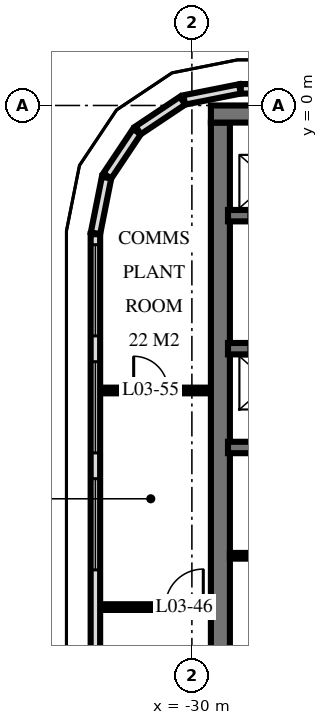
"""IFC4 building model, lengths in metres.
Left out: names, types, materials, properties, quantities, classifications, styles, units other than length and angle.
Written with IfcOpenShell. Run it as: python <this file> out.ifc"""

import sys

from ifc_helpers import new_model, si_unit, direction, frame, frame_2d, origin, place, context, subcontext, project, spatial, rectangle, extrude, element, fill, save


model = new_model("IFC4")
c1 = context("Model", 3, precision=1e-05, world=origin(), true_north=direction((0.0, 1.0)))
c2 = subcontext(c1, "Body", "Model", "MODEL_VIEW")
j1 = project(units=[si_unit("LENGTHUNIT", "METRE"), si_unit("PLANEANGLEUNIT", "RADIAN")], contexts=[c1])
p1 = place(None, origin())
s1 = spatial("IfcSite", under=j1, at=p1, CompositionType="ELEMENT")
p2 = place(p1, origin())
s2 = spatial("IfcBuilding", under=s1, at=p2, CompositionType="ELEMENT")
p3 = place(p2, frame((0.0, 0.0, 18.0)))
s3 = spatial("IfcBuildingStorey", under=s2, at=p3, CompositionType="ELEMENT", Elevation=18.0)
p4 = place(p3, frame((-29.5, -0.225, 0.0), z_axis=(0.0, 0.0, 1.0), x_axis=(1.0, 0.0, 0.0)))
e1 = element("IfcWall", 1, at=p4, inside=s3, PredefinedType="SHEAR", context=c2, shape_type="SweptSolid", body=[
    extrude(rectangle(XDim=19.5, YDim=0.45, at=frame_2d((9.75, 0.0))), origin(), (0.0, 0.0, 1.0), 6.0),
])
p5 = place(p3, frame((-29.25, -14.55, 0.0), z_axis=(0.0, 0.0, 1.0), x_axis=(0.0, 1.0, 0.0)))
e2 = element("IfcWall", 2, at=p5, inside=s3, PredefinedType="SHEAR", context=c2, shape_type="SweptSolid", body=[
    extrude(rectangle(XDim=14.1, YDim=0.5, at=frame_2d((7.05, 0.0))), origin(), (0.0, 0.0, 1.0), 6.0),
])
p6 = place(p3, frame((-29.05, -2.9, 0.0), z_axis=(0.0, 0.0, 1.0), x_axis=(1.0, 0.0, 0.0)))
e3 = element("IfcWall", 3, at=p6, inside=s3, PredefinedType="SHEAR", context=c2, shape_type="SweptSolid", body=[
    extrude(rectangle(XDim=18.7, YDim=0.3, at=frame_2d((9.35, 0.0))), origin(), (0.0, 0.0, 1.0), 6.0),
])
p7 = place(p6, frame((2.95, 0.0, 0.0)))
e4 = element("IfcOpeningElement", 4, at=p7, cuts=e3, PredefinedType="OPENING", context=c2, shape_type="SweptSolid", body=[
    extrude(rectangle(XDim=1.1, YDim=2.1, at=frame_2d((0.55, 1.05))), frame((0.0, 0.16, 0.0), z_axis=(0.0, -1.0, 0.0), x_axis=(1.0, 0.0, 0.0)), (0.0, 0.0, 1.0), 0.32),
])
p8 = place(p6, frame((0.55, 0.0, 0.0)))
e5 = element("IfcOpeningElement", 5, at=p8, cuts=e3, PredefinedType="OPENING", context=c2, shape_type="SweptSolid", body=[
    extrude(rectangle(XDim=1.1, YDim=2.1, at=frame_2d((0.55, 1.05))), frame((0.0, 0.16, 0.0), z_axis=(0.0, -1.0, 0.0), x_axis=(1.0, 0.0, 0.0)), (0.0, 0.0, 1.0), 0.32),
])
p9 = place(p6, frame((11.613, 0.0, 0.0)))
e6 = element("IfcOpeningElement", 6, at=p9, cuts=e3, PredefinedType="OPENING", context=c2, shape_type="SweptSolid", body=[
    extrude(rectangle(XDim=0.9, YDim=2.1, at=frame_2d((0.45, 1.05))), frame((0.0, 0.16, 0.0), z_axis=(0.0, -1.0, 0.0), x_axis=(1.0, 0.0, 0.0)), (0.0, 0.0, 1.0), 0.32),
])
p10 = place(p6, frame((10.188, 0.0, 0.0)))
e7 = element("IfcOpeningElement", 7, at=p10, cuts=e3, PredefinedType="OPENING", context=c2, shape_type="SweptSolid", body=[
    extrude(rectangle(XDim=0.9, YDim=2.1, at=frame_2d((0.45, 1.05))), frame((0.0, 0.16, 0.0), z_axis=(0.0, -1.0, 0.0), x_axis=(1.0, 0.0, 0.0)), (0.0, 0.0, 1.0), 0.32),
])
p11 = place(p6, frame((17.562, 0.0, 0.0)))
e8 = element("IfcOpeningElement", 8, at=p11, cuts=e3, PredefinedType="OPENING", context=c2, shape_type="SweptSolid", body=[
    extrude(rectangle(XDim=1.0, YDim=2.1, at=frame_2d((0.5, 1.05))), frame((0.0, 0.16, 0.0), z_axis=(0.0, -1.0, 0.0), x_axis=(1.0, 0.0, 0.0)), (0.0, 0.0, 1.0), 0.32),
])
p12 = place(p6, frame((16.137, 0.0, 0.0)))
e9 = element("IfcOpeningElement", 9, at=p12, cuts=e3, PredefinedType="OPENING", context=c2, shape_type="SweptSolid", body=[
    extrude(rectangle(XDim=1.0, YDim=2.1, at=frame_2d((0.5, 1.05))), frame((0.0, 0.16, 0.0), z_axis=(0.0, -1.0, 0.0), x_axis=(1.0, 0.0, 0.0)), (0.0, 0.0, 1.0), 0.32),
])
p13 = place(p6, frame((13.85, 0.0, 0.0)))
e10 = element("IfcOpeningElement", 10, at=p13, cuts=e3, PredefinedType="OPENING", context=c2, shape_type="SweptSolid", body=[
    extrude(rectangle(XDim=1.0, YDim=2.1, at=frame_2d((0.5, 1.05))), frame((0.0, 0.16, 0.0), z_axis=(0.0, -1.0, 0.0), x_axis=(1.0, 0.0, 0.0)), (0.0, 0.0, 1.0), 0.32),
])
p14 = place(p6, frame((5.6, 0.0, 0.0)))
e11 = element("IfcOpeningElement", 11, at=p14, cuts=e3, PredefinedType="OPENING", context=c2, shape_type="SweptSolid", body=[
    extrude(rectangle(XDim=1.0, YDim=2.1, at=frame_2d((0.5, 1.05))), frame((0.0, 0.16, 0.0), z_axis=(0.0, -1.0, 0.0), x_axis=(1.0, 0.0, 0.0)), (0.0, 0.0, 1.0), 0.32),
])
p15 = place(p3, frame((-29.05, -6.4, 0.0), z_axis=(0.0, 0.0, 1.0), x_axis=(1.0, 0.0, 0.0)))
e12 = element("IfcWall", 12, at=p15, inside=s3, PredefinedType="SHEAR", context=c2, shape_type="SweptSolid", body=[
    extrude(rectangle(XDim=18.7, YDim=0.3, at=frame_2d((9.35, 0.0))), origin(), (0.0, 0.0, 1.0), 6.0),
])
p16 = place(p15, frame((2.95, 0.0, 0.0)))
e13 = element("IfcOpeningElement", 13, at=p16, cuts=e12, PredefinedType="OPENING", context=c2, shape_type="SweptSolid", body=[
    extrude(rectangle(XDim=1.1, YDim=2.1, at=frame_2d((0.55, 1.05))), frame((0.0, 0.16, 0.0), z_axis=(0.0, -1.0, 0.0), x_axis=(1.0, 0.0, 0.0)), (0.0, 0.0, 1.0), 0.32),
])
p17 = place(p15, frame((0.55, 0.0, 0.0)))
e14 = element("IfcOpeningElement", 14, at=p17, cuts=e12, PredefinedType="OPENING", context=c2, shape_type="SweptSolid", body=[
    extrude(rectangle(XDim=1.1, YDim=2.1, at=frame_2d((0.55, 1.05))), frame((0.0, 0.16, 0.0), z_axis=(0.0, -1.0, 0.0), x_axis=(1.0, 0.0, 0.0)), (0.0, 0.0, 1.0), 0.32),
])
p18 = place(p15, frame((10.8, 0.0, 0.0)))
e15 = element("IfcOpeningElement", 15, at=p18, cuts=e12, PredefinedType="OPENING", context=c2, shape_type="SweptSolid", body=[
    extrude(rectangle(XDim=1.1, YDim=2.1, at=frame_2d((0.55, 1.05))), frame((0.0, 0.16, 0.0), z_axis=(0.0, -1.0, 0.0), x_axis=(1.0, 0.0, 0.0)), (0.0, 0.0, 1.0), 0.32),
])
p19 = place(p15, frame((5.6, 0.0, 0.0)))
e16 = element("IfcOpeningElement", 16, at=p19, cuts=e12, PredefinedType="OPENING", context=c2, shape_type="SweptSolid", body=[
    extrude(rectangle(XDim=1.0, YDim=2.1, at=frame_2d((0.5, 1.05))), frame((0.0, 0.16, 0.0), z_axis=(0.0, -1.0, 0.0), x_axis=(1.0, 0.0, 0.0)), (0.0, 0.0, 1.0), 0.32),
])
p20 = place(p3, frame((-29.05, -9.0, 0.0), z_axis=(0.0, 0.0, 1.0), x_axis=(1.0, 0.0, 0.0)))
e17 = element("IfcWall", 17, at=p20, inside=s3, PredefinedType="SHEAR", context=c2, shape_type="SweptSolid", body=[
    extrude(rectangle(XDim=18.7, YDim=0.3, at=frame_2d((9.35, 0.0))), origin(), (0.0, 0.0, 1.0), 6.0),
])
p21 = place(p20, frame((13.8, 0.0, 0.0)))
e18 = element("IfcOpeningElement", 18, at=p21, cuts=e17, PredefinedType="OPENING", context=c2, shape_type="SweptSolid", body=[
    extrude(rectangle(XDim=1.1, YDim=2.1, at=frame_2d((0.55, 1.05))), frame((0.0, 0.16, 0.0), z_axis=(0.0, -1.0, 0.0), x_axis=(1.0, 0.0, 0.0)), (0.0, 0.0, 1.0), 0.32),
])
p22 = place(p3, frame((28.713, 0.439, 0.0), z_axis=(0.0, 0.0, 1.0), x_axis=(-1.0, 0.0, 0.0)))
e19 = element("IfcWall", 19, at=p22, inside=s3, PredefinedType="SOLIDWALL", context=c2, shape_type="SweptSolid", body=[
    extrude(rectangle(XDim=57.426, YDim=0.25, at=frame_2d((28.713, 0.0))), origin(), (0.0, 0.0, 1.0), 5.72),
])
p23 = place(p22, frame((0.252, 0.0, 0.858)))
e20 = element("IfcOpeningElement", 20, at=p23, cuts=e19, PredefinedType="OPENING", context=c2, shape_type="SweptSolid", body=[
    extrude(rectangle(XDim=2.4, YDim=3.6, at=frame_2d((1.2, 1.8))), frame((0.0, 0.135, 0.0), z_axis=(0.0, -1.0, 0.0), x_axis=(1.0, 0.0, 0.0)), (0.0, 0.0, 1.0), 0.27),
])
p24 = place(p22, frame((3.281, 0.0, 0.858)))
e21 = element("IfcOpeningElement", 21, at=p24, cuts=e19, PredefinedType="OPENING", context=c2, shape_type="SweptSolid", body=[
    extrude(rectangle(XDim=2.4, YDim=3.6, at=frame_2d((1.2, 1.8))), frame((0.0, 0.135, 0.0), z_axis=(0.0, -1.0, 0.0), x_axis=(1.0, 0.0, 0.0)), (0.0, 0.0, 1.0), 0.27),
])
p25 = place(p22, frame((6.31, 0.0, 0.858)))
e22 = element("IfcOpeningElement", 22, at=p25, cuts=e19, PredefinedType="OPENING", context=c2, shape_type="SweptSolid", body=[
    extrude(rectangle(XDim=2.4, YDim=3.6, at=frame_2d((1.2, 1.8))), frame((0.0, 0.135, 0.0), z_axis=(0.0, -1.0, 0.0), x_axis=(1.0, 0.0, 0.0)), (0.0, 0.0, 1.0), 0.27),
])
p26 = place(p22, frame((9.339, 0.0, 0.858)))
e23 = element("IfcOpeningElement", 23, at=p26, cuts=e19, PredefinedType="OPENING", context=c2, shape_type="SweptSolid", body=[
    extrude(rectangle(XDim=2.4, YDim=3.6, at=frame_2d((1.2, 1.8))), frame((0.0, 0.135, 0.0), z_axis=(0.0, -1.0, 0.0), x_axis=(1.0, 0.0, 0.0)), (0.0, 0.0, 1.0), 0.27),
])
p27 = place(p22, frame((12.368, 0.0, 0.858)))
e24 = element("IfcOpeningElement", 24, at=p27, cuts=e19, PredefinedType="OPENING", context=c2, shape_type="SweptSolid", body=[
    extrude(rectangle(XDim=2.4, YDim=3.6, at=frame_2d((1.2, 1.8))), frame((0.0, 0.135, 0.0), z_axis=(0.0, -1.0, 0.0), x_axis=(1.0, 0.0, 0.0)), (0.0, 0.0, 1.0), 0.27),
])
p28 = place(p22, frame((15.397, 0.0, 0.858)))
e25 = element("IfcOpeningElement", 25, at=p28, cuts=e19, PredefinedType="OPENING", context=c2, shape_type="SweptSolid", body=[
    extrude(rectangle(XDim=2.4, YDim=3.6, at=frame_2d((1.2, 1.8))), frame((0.0, 0.135, 0.0), z_axis=(0.0, -1.0, 0.0), x_axis=(1.0, 0.0, 0.0)), (0.0, 0.0, 1.0), 0.27),
])
p29 = place(p22, frame((18.426, 0.0, 0.858)))
e26 = element("IfcOpeningElement", 26, at=p29, cuts=e19, PredefinedType="OPENING", context=c2, shape_type="SweptSolid", body=[
    extrude(rectangle(XDim=2.4, YDim=3.6, at=frame_2d((1.2, 1.8))), frame((0.0, 0.135, 0.0), z_axis=(0.0, -1.0, 0.0), x_axis=(1.0, 0.0, 0.0)), (0.0, 0.0, 1.0), 0.27),
])
p30 = place(p22, frame((21.455, 0.0, 0.858)))
e27 = element("IfcOpeningElement", 27, at=p30, cuts=e19, PredefinedType="OPENING", context=c2, shape_type="SweptSolid", body=[
    extrude(rectangle(XDim=2.4, YDim=3.6, at=frame_2d((1.2, 1.8))), frame((0.0, 0.135, 0.0), z_axis=(0.0, -1.0, 0.0), x_axis=(1.0, 0.0, 0.0)), (0.0, 0.0, 1.0), 0.27),
])
p31 = place(p22, frame((24.484, 0.0, 0.858)))
e28 = element("IfcOpeningElement", 28, at=p31, cuts=e19, PredefinedType="OPENING", context=c2, shape_type="SweptSolid", body=[
    extrude(rectangle(XDim=2.4, YDim=3.6, at=frame_2d((1.2, 1.8))), frame((0.0, 0.135, 0.0), z_axis=(0.0, -1.0, 0.0), x_axis=(1.0, 0.0, 0.0)), (0.0, 0.0, 1.0), 0.27),
])
p32 = place(p22, frame((27.513, 0.0, 0.858)))
e29 = element("IfcOpeningElement", 29, at=p32, cuts=e19, PredefinedType="OPENING", context=c2, shape_type="SweptSolid", body=[
    extrude(rectangle(XDim=2.4, YDim=3.6, at=frame_2d((1.2, 1.8))), frame((0.0, 0.135, 0.0), z_axis=(0.0, -1.0, 0.0), x_axis=(1.0, 0.0, 0.0)), (0.0, 0.0, 1.0), 0.27),
])
p33 = place(p22, frame((30.542, 0.0, 0.858)))
e30 = element("IfcOpeningElement", 30, at=p33, cuts=e19, PredefinedType="OPENING", context=c2, shape_type="SweptSolid", body=[
    extrude(rectangle(XDim=2.4, YDim=3.6, at=frame_2d((1.2, 1.8))), frame((0.0, 0.135, 0.0), z_axis=(0.0, -1.0, 0.0), x_axis=(1.0, 0.0, 0.0)), (0.0, 0.0, 1.0), 0.27),
])
p34 = place(p22, frame((33.571, 0.0, 0.858)))
e31 = element("IfcOpeningElement", 31, at=p34, cuts=e19, PredefinedType="OPENING", context=c2, shape_type="SweptSolid", body=[
    extrude(rectangle(XDim=2.4, YDim=3.6, at=frame_2d((1.2, 1.8))), frame((0.0, 0.135, 0.0), z_axis=(0.0, -1.0, 0.0), x_axis=(1.0, 0.0, 0.0)), (0.0, 0.0, 1.0), 0.27),
])
p35 = place(p22, frame((36.6, 0.0, 0.858)))
e32 = element("IfcOpeningElement", 32, at=p35, cuts=e19, PredefinedType="OPENING", context=c2, shape_type="SweptSolid", body=[
    extrude(rectangle(XDim=2.4, YDim=3.6, at=frame_2d((1.2, 1.8))), frame((0.0, 0.135, 0.0), z_axis=(0.0, -1.0, 0.0), x_axis=(1.0, 0.0, 0.0)), (0.0, 0.0, 1.0), 0.27),
])
p36 = place(p22, frame((39.629, 0.0, 0.858)))
e33 = element("IfcOpeningElement", 33, at=p36, cuts=e19, PredefinedType="OPENING", context=c2, shape_type="SweptSolid", body=[
    extrude(rectangle(XDim=2.4, YDim=3.6, at=frame_2d((1.2, 1.8))), frame((0.0, 0.135, 0.0), z_axis=(0.0, -1.0, 0.0), x_axis=(1.0, 0.0, 0.0)), (0.0, 0.0, 1.0), 0.27),
])
p37 = place(p22, frame((42.658, 0.0, 0.858)))
e34 = element("IfcOpeningElement", 34, at=p37, cuts=e19, PredefinedType="OPENING", context=c2, shape_type="SweptSolid", body=[
    extrude(rectangle(XDim=2.4, YDim=3.6, at=frame_2d((1.2, 1.8))), frame((0.0, 0.135, 0.0), z_axis=(0.0, -1.0, 0.0), x_axis=(1.0, 0.0, 0.0)), (0.0, 0.0, 1.0), 0.27),
])
p38 = place(p22, frame((45.687, 0.0, 0.858)))
e35 = element("IfcOpeningElement", 35, at=p38, cuts=e19, PredefinedType="OPENING", context=c2, shape_type="SweptSolid", body=[
    extrude(rectangle(XDim=2.4, YDim=3.6, at=frame_2d((1.2, 1.8))), frame((0.0, 0.135, 0.0), z_axis=(0.0, -1.0, 0.0), x_axis=(1.0, 0.0, 0.0)), (0.0, 0.0, 1.0), 0.27),
])
p39 = place(p22, frame((48.716, 0.0, 0.858)))
e36 = element("IfcOpeningElement", 36, at=p39, cuts=e19, PredefinedType="OPENING", context=c2, shape_type="SweptSolid", body=[
    extrude(rectangle(XDim=2.4, YDim=3.6, at=frame_2d((1.2, 1.8))), frame((0.0, 0.135, 0.0), z_axis=(0.0, -1.0, 0.0), x_axis=(1.0, 0.0, 0.0)), (0.0, 0.0, 1.0), 0.27),
])
p40 = place(p22, frame((51.745, 0.0, 0.858)))
e37 = element("IfcOpeningElement", 37, at=p40, cuts=e19, PredefinedType="OPENING", context=c2, shape_type="SweptSolid", body=[
    extrude(rectangle(XDim=2.4, YDim=3.6, at=frame_2d((1.2, 1.8))), frame((0.0, 0.135, 0.0), z_axis=(0.0, -1.0, 0.0), x_axis=(1.0, 0.0, 0.0)), (0.0, 0.0, 1.0), 0.27),
])
p41 = place(p22, frame((54.774, 0.0, 0.858)))
e38 = element("IfcOpeningElement", 38, at=p41, cuts=e19, PredefinedType="OPENING", context=c2, shape_type="SweptSolid", body=[
    extrude(rectangle(XDim=2.4, YDim=3.6, at=frame_2d((1.2, 1.8))), frame((0.0, 0.135, 0.0), z_axis=(0.0, -1.0, 0.0), x_axis=(1.0, 0.0, 0.0)), (0.0, 0.0, 1.0), 0.27),
])
p42 = place(p3, frame((-28.737, 0.437, 0.0), z_axis=(0.0, 0.0, 1.0), x_axis=(-0.980800292268, -0.195014837095, 0.0)))
e39 = element("IfcWall", 39, at=p42, inside=s3, PredefinedType="SOLIDWALL", context=c2, shape_type="SweptSolid", body=[
    extrude(rectangle(XDim=1.492, YDim=0.25, at=frame_2d((0.746, 0.0))), origin(), (0.0, 0.0, 1.0), 5.72),
])
for number, where, z_axis, x_axis in (
    (40, (-30.246, 0.127, 0.0), (0.0, 0.0, 1.0), (-0.831, -0.556, 0.0)),
    (41, (-31.447, -0.687, 0.0), (0.0, 0.0, 1.0), (-0.556, -0.831, 0.0)),
):
    element("IfcWall", number, at=place(p3, frame(where, z_axis=z_axis, x_axis=x_axis)), inside=s3, PredefinedType="SOLIDWALL", context=c2, shape_type="SweptSolid", body=[
        extrude(rectangle(XDim=1.403, YDim=0.25, at=frame_2d((0.702, 0.0))), origin(), (0.0, 0.0, 1.0), 5.72),
    ])
p43 = place(p3, frame((-32.246, -1.899, 0.0), z_axis=(0.0, 0.0, 1.0), x_axis=(-0.195014837095, -0.980800292268, 0.0)))
e42 = element("IfcWall", 42, at=p43, inside=s3, PredefinedType="SOLIDWALL", context=c2, shape_type="SweptSolid", body=[
    extrude(rectangle(XDim=1.492, YDim=0.25, at=frame_2d((0.746, 0.0))), origin(), (0.0, 0.0, 1.0), 5.72),
])
p44 = place(p3, frame((-32.539, -3.387, 0.0), z_axis=(0.0, 0.0, 1.0), x_axis=(0.0, -1.0, 0.0)))
e43 = element("IfcWall", 43, at=p44, inside=s3, PredefinedType="SOLIDWALL", context=c2, shape_type="SweptSolid", body=[
    extrude(rectangle(XDim=12.502, YDim=0.25, at=frame_2d((6.251, 0.0))), origin(), (0.0, 0.0, 1.0), 5.72),
])
p45 = place(p44, frame((0.277, 0.0, 1.005)))
e44 = element("IfcOpeningElement", 44, at=p45, cuts=e43, PredefinedType="OPENING", context=c2, shape_type="SweptSolid", body=[
    extrude(rectangle(XDim=2.4, YDim=3.6, at=frame_2d((1.2, 1.8))), frame((0.0, 0.135, 0.0), z_axis=(0.0, -1.0, 0.0), x_axis=(1.0, 0.0, 0.0)), (0.0, 0.0, 1.0), 0.27),
])
p46 = place(p44, frame((3.355, 0.0, 1.005)))
e45 = element("IfcOpeningElement", 45, at=p46, cuts=e43, PredefinedType="OPENING", context=c2, shape_type="SweptSolid", body=[
    extrude(rectangle(XDim=2.4, YDim=3.6, at=frame_2d((1.2, 1.8))), frame((0.0, 0.135, 0.0), z_axis=(0.0, -1.0, 0.0), x_axis=(1.0, 0.0, 0.0)), (0.0, 0.0, 1.0), 0.27),
])
p47 = place(p44, frame((6.434, 0.0, 1.005)))
e46 = element("IfcOpeningElement", 46, at=p47, cuts=e43, PredefinedType="OPENING", context=c2, shape_type="SweptSolid", body=[
    extrude(rectangle(XDim=2.4, YDim=3.6, at=frame_2d((1.2, 1.8))), frame((0.0, 0.135, 0.0), z_axis=(0.0, -1.0, 0.0), x_axis=(1.0, 0.0, 0.0)), (0.0, 0.0, 1.0), 0.27),
])
p48 = place(p3, frame((-29.0, -11.85, 0.0), z_axis=(0.0, 0.0, 1.0), x_axis=(1.0, 0.0, 0.0)))
e47 = element("IfcWall", 47, at=p48, inside=s3, PredefinedType="PARTITIONING", context=c2, shape_type="SweptSolid", body=[
    extrude(rectangle(XDim=4.5, YDim=0.15, at=frame_2d((2.25, 0.0))), origin(), (0.0, 0.0, 1.0), 5.7),
])
p49 = place(p48, frame((1.75, 0.0, 0.0)))
e48 = element("IfcOpeningElement", 48, at=p49, cuts=e47, PredefinedType="OPENING", context=c2, shape_type="SweptSolid", body=[
    extrude(rectangle(XDim=1.0, YDim=2.1, at=frame_2d((0.5, 1.05))), frame((0.0, 0.085, 0.0), z_axis=(0.0, -1.0, 0.0), x_axis=(1.0, 0.0, 0.0)), (0.0, 0.0, 1.0), 0.17),
])
p50 = place(p3, frame((-32.484, -13.2, 0.0), z_axis=(0.0, 0.0, 1.0), x_axis=(1.0, 0.0, 0.0)))
e49 = element("IfcWall", 49, at=p50, inside=s3, PredefinedType="PARTITIONING", context=c2, shape_type="SweptSolid", body=[
    extrude(rectangle(XDim=2.934, YDim=0.15, at=frame_2d((1.467, 0.0))), origin(), (0.0, 0.0, 1.0), 5.55),
])
p51 = place(p50, frame((1.784, 0.0, 0.0)))
e50 = element("IfcOpeningElement", 50, at=p51, cuts=e49, PredefinedType="OPENING", context=c2, shape_type="SweptSolid", body=[
    extrude(rectangle(XDim=1.0, YDim=2.1, at=frame_2d((0.5, 1.05))), frame((0.0, 0.085, 0.0), z_axis=(0.0, -1.0, 0.0), x_axis=(1.0, 0.0, 0.0)), (0.0, 0.0, 1.0), 0.17),
])
p52 = place(p3, frame((-32.413, -7.5, 0.0), z_axis=(0.0, 0.0, 1.0), x_axis=(1.0, 0.0, 0.0)))
e51 = element("IfcWall", 51, at=p52, inside=s3, PredefinedType="PARTITIONING", context=c2, shape_type="SweptSolid", body=[
    extrude(rectangle(XDim=2.863, YDim=0.15, at=frame_2d((1.431, 0.0))), origin(), (0.0, 0.0, 1.0), 5.55),
])
p53 = place(p52, frame((0.881, 0.0, 0.0)))
e52 = element("IfcOpeningElement", 52, at=p53, cuts=e51, PredefinedType="OPENING", context=c2, shape_type="SweptSolid", body=[
    extrude(rectangle(XDim=0.9, YDim=2.1, at=frame_2d((0.45, 1.05))), frame((0.0, 0.085, 0.0), z_axis=(0.0, -1.0, 0.0), x_axis=(1.0, 0.0, 0.0)), (0.0, 0.0, 1.0), 0.17),
])
p54 = place(p45, origin())
e53 = element("IfcWindow", 53, at=p54, inside=s3, PartitioningType="SINGLE_PANEL", PredefinedType="USERDEFINED", context=c2, shape_type="SweptSolid", body=[
    extrude(rectangle(XDim=2.4, YDim=3.6, at=frame_2d((1.2, 1.8))), frame((0.0, 0.125, 0.0), z_axis=(0.0, -1.0, 0.0), x_axis=(1.0, 0.0, 0.0)), (0.0, 0.0, 1.0), 0.06),
])
fill(e44, e53)
p55 = place(p46, origin())
e54 = element("IfcWindow", 54, at=p55, inside=s3, PartitioningType="SINGLE_PANEL", PredefinedType="USERDEFINED", context=c2, shape_type="SweptSolid", body=[
    extrude(rectangle(XDim=2.4, YDim=3.6, at=frame_2d((1.2, 1.8))), frame((0.0, 0.125, 0.0), z_axis=(0.0, -1.0, 0.0), x_axis=(1.0, 0.0, 0.0)), (0.0, 0.0, 1.0), 0.06),
])
fill(e45, e54)
p56 = place(p47, origin())
e55 = element("IfcWindow", 55, at=p56, inside=s3, PartitioningType="SINGLE_PANEL", PredefinedType="USERDEFINED", context=c2, shape_type="SweptSolid", body=[
    extrude(rectangle(XDim=2.4, YDim=3.6, at=frame_2d((1.2, 1.8))), frame((0.0, 0.125, 0.0), z_axis=(0.0, -1.0, 0.0), x_axis=(1.0, 0.0, 0.0)), (0.0, 0.0, 1.0), 0.06),
])
fill(e46, e55)
p57 = place(p51, origin())
e56 = element("IfcDoor", 56, at=p57, inside=s3, OperationType="SINGLE_SWING_LEFT", PredefinedType="DOOR", context=c2, shape_type="SweptSolid", body=[
    extrude(rectangle(XDim=1.0, YDim=2.1, at=frame_2d((0.5, 1.05))), frame((0.0, 0.025, 0.0), z_axis=(0.0, -1.0, 0.0), x_axis=(1.0, 0.0, 0.0)), (0.0, 0.0, 1.0), 0.05),
])
fill(e50, e56)
p58 = place(p53, origin())
e57 = element("IfcDoor", 57, at=p58, inside=s3, OperationType="SINGLE_SWING_RIGHT", PredefinedType="DOOR", context=c2, shape_type="SweptSolid", body=[
    extrude(rectangle(XDim=0.9, YDim=2.1, at=frame_2d((0.45, 1.05))), frame((0.0, 0.025, 0.0), z_axis=(0.0, -1.0, 0.0), x_axis=(1.0, 0.0, 0.0)), (0.0, 0.0, 1.0), 0.05),
])
fill(e52, e57)
save(model, sys.argv[1])
